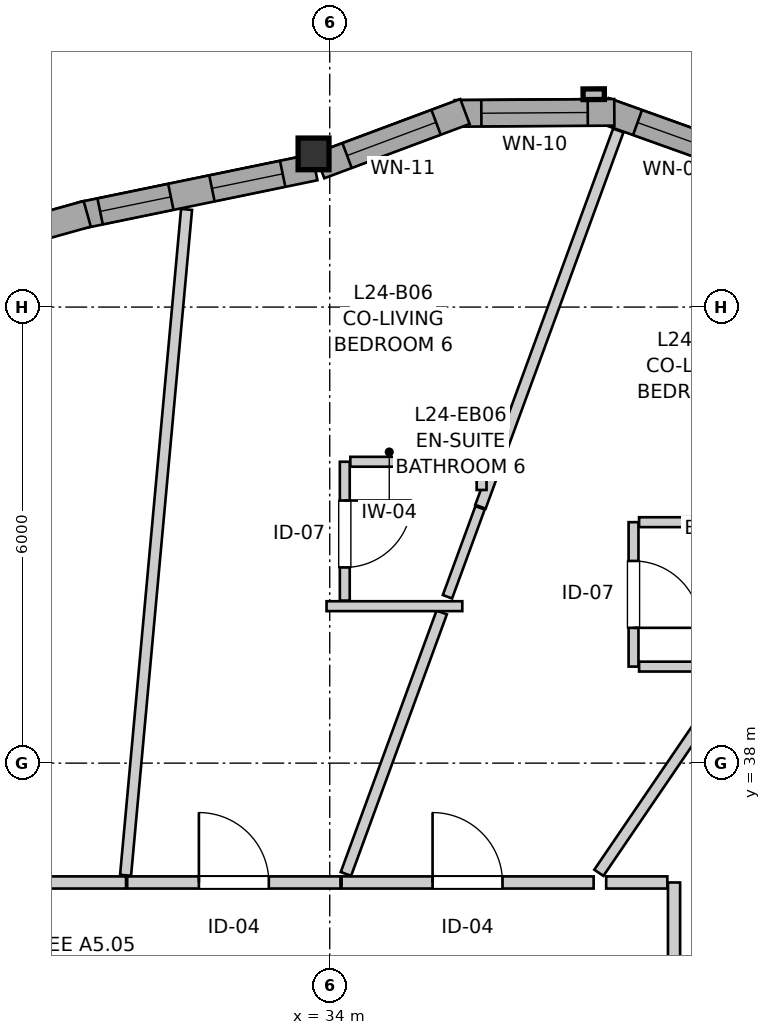
"""IFC4 building model, lengths in metres.
Left out: names, types, materials, properties, quantities, classifications, styles, units other than length and angle.
Written with IfcOpenShell. Run it as: python <this file> out.ifc"""

import sys

from ifc_helpers import new_model, si_unit, direction, frame, frame_2d, origin, origin_2d, place, context, subcontext, project, spatial, rectangle, i_section, extrude, source, transform, mapped, element, fill, save


model = new_model("IFC4")
c1 = context("Model", 3, precision=1e-05, world=origin(), true_north=direction((0.0, 1.0)))
c2 = subcontext(c1, "Body", "Model", "MODEL_VIEW")
j1 = project(units=[si_unit("LENGTHUNIT", "METRE"), si_unit("PLANEANGLEUNIT", "RADIAN")], contexts=[c1])
p1 = place(None, origin())
s1 = spatial("IfcSite", under=j1, at=p1, CompositionType="ELEMENT")
p2 = place(p1, origin())
s2 = spatial("IfcBuilding", under=s1, at=p2, CompositionType="ELEMENT")
p3 = place(p2, frame((0.0, 0.0, 83.2)))
s3 = spatial("IfcBuildingStorey", under=s2, at=p3, CompositionType="ELEMENT", Elevation=83.2)
m1 = source(origin(), c2, "Body", "SweptSolid", [
    extrude(i_section(OverallWidth=0.406, OverallDepth=0.416, WebThickness=0.027, FlangeThickness=0.044, FilletRadius=0.015, at=origin_2d()), origin(), (0.0, 0.0, 1.0), 2.935),
])
p4 = place(p3, frame((33.787, 46.015, 0.0), z_axis=(0.0, 0.0, 1.0), x_axis=(1.0, 0.0, 0.0)))
e1 = element("IfcColumn", 1, at=p4, inside=s3, PredefinedType="PILASTER", context=c2, shape_type="MappedRepresentation", body=[
    mapped(m1, transform((0.0, 0.0, 0.0), x_axis=(1.0, 0.0, 0.0), y_axis=(0.0, 1.0, 0.0), z_axis=(0.0, 0.0, 1.0), scale=1.0)),
])
p5 = place(p3, frame((39.586, 45.877, 0.0), z_axis=(0.0, 0.0, 1.0), x_axis=(-0.941473186867, 0.33708787936, 0.0)))
e2 = element("IfcWall", 2, at=p5, inside=s3, PredefinedType="SOLIDWALL", context=c2, shape_type="SweptSolid", body=[
    extrude(rectangle(XDim=2.099, YDim=0.35, at=frame_2d((1.049, 0.0))), origin(), (0.0, 0.0, 1.0), 2.465),
])
p6 = place(p5, frame((0.283, 0.0, 0.82)))
e3 = element("IfcOpeningElement", 3, at=p6, cuts=e2, PredefinedType="OPENING", context=c2, shape_type="SweptSolid", body=[
    extrude(rectangle(XDim=1.35, YDim=1.45, at=frame_2d((0.675, 0.725))), frame((0.0, 0.185, 0.0), z_axis=(0.0, -1.0, 0.0), x_axis=(1.0, 0.0, 0.0)), (0.0, 0.0, 1.0), 0.37),
])
p7 = place(p3, frame((37.744, 46.562, 0.0), z_axis=(0.0, 0.0, 1.0), x_axis=(-0.999976451414, -0.006862697526, 0.0)))
e4 = element("IfcWall", 4, at=p7, inside=s3, PredefinedType="SOLIDWALL", context=c2, shape_type="SweptSolid", body=[
    extrude(rectangle(XDim=2.099, YDim=0.35, at=frame_2d((1.049, 0.0))), origin(), (0.0, 0.0, 1.0), 2.465),
])
p8 = place(p7, frame((0.35, 0.0, 0.82)))
e5 = element("IfcOpeningElement", 5, at=p8, cuts=e4, PredefinedType="OPENING", context=c2, shape_type="SweptSolid", body=[
    extrude(rectangle(XDim=1.4, YDim=1.35, at=frame_2d((0.7, 0.675))), frame((0.0, 0.185, 0.0), z_axis=(0.0, -1.0, 0.0), x_axis=(1.0, 0.0, 0.0)), (0.0, 0.0, 1.0), 0.37),
])
p9 = place(p3, frame((35.779, 46.573, 0.0), z_axis=(0.0, 0.0, 1.0), x_axis=(-0.9368002254, -0.349864741994, 0.0)))
e6 = element("IfcWall", 6, at=p9, inside=s3, PredefinedType="SOLIDWALL", context=c2, shape_type="SweptSolid", body=[
    extrude(rectangle(XDim=2.041, YDim=0.35, at=frame_2d((1.021, 0.0))), origin(), (0.0, 0.0, 1.0), 2.465),
])
p10 = place(p9, frame((0.406, 0.0, 0.82)))
e7 = element("IfcOpeningElement", 7, at=p10, cuts=e6, PredefinedType="OPENING", context=c2, shape_type="SweptSolid", body=[
    extrude(rectangle(XDim=1.25, YDim=1.35, at=frame_2d((0.625, 0.675))), frame((0.0, 0.185, 0.0), z_axis=(0.0, -1.0, 0.0), x_axis=(1.0, 0.0, 0.0)), (0.0, 0.0, 1.0), 0.37),
])
p11 = place(p3, frame((33.803, 45.84, 0.0), z_axis=(0.0, 0.0, 1.0), x_axis=(-0.97943222174, -0.201773444777, 0.0)))
e8 = element("IfcWall", 8, at=p11, inside=s3, PredefinedType="SOLIDWALL", context=c2, shape_type="SweptSolid", body=[
    extrude(rectangle(XDim=3.144, YDim=0.35, at=frame_2d((1.572, 0.0))), origin(), (0.0, 0.0, 1.0), 2.465),
])
p12 = place(p11, frame((0.431, 0.0, 0.82)))
e9 = element("IfcOpeningElement", 9, at=p12, cuts=e8, PredefinedType="OPENING", context=c2, shape_type="SweptSolid", body=[
    extrude(rectangle(XDim=0.95, YDim=1.35, at=frame_2d((0.475, 0.675))), frame((0.0, 0.185, 0.0), z_axis=(0.0, -1.0, 0.0), x_axis=(1.0, 0.0, 0.0)), (0.0, 0.0, 1.0), 0.37),
])
p13 = place(p11, frame((1.933, 0.0, 0.82)))
e10 = element("IfcOpeningElement", 10, at=p13, cuts=e8, PredefinedType="OPENING", context=c2, shape_type="SweptSolid", body=[
    extrude(rectangle(XDim=0.95, YDim=1.35, at=frame_2d((0.475, 0.675))), frame((0.0, 0.185, 0.0), z_axis=(0.0, -1.0, 0.0), x_axis=(1.0, 0.0, 0.0)), (0.0, 0.0, 1.0), 0.37),
])
p14 = place(p3, frame((30.809, 45.227, 0.0), z_axis=(0.0, 0.0, 1.0), x_axis=(-0.963041637143, -0.269352566591, 0.0)))
e11 = element("IfcWall", 11, at=p14, inside=s3, PredefinedType="SOLIDWALL", context=c2, shape_type="SweptSolid", body=[
    extrude(rectangle(XDim=2.873, YDim=0.35, at=frame_2d((1.437, 0.0))), origin(), (0.0, 0.0, 1.0), 2.465),
])
p15 = place(p14, frame((0.717, 0.0, 0.82)))
e12 = element("IfcOpeningElement", 12, at=p15, cuts=e11, PredefinedType="OPENING", context=c2, shape_type="SweptSolid", body=[
    extrude(rectangle(XDim=1.45, YDim=1.25, at=frame_2d((0.725, 0.625))), frame((0.0, 0.185, 0.0), z_axis=(0.0, -1.0, 0.0), x_axis=(1.0, 0.0, 0.0)), (0.0, 0.0, 1.0), 0.37),
])
p16 = place(p3, frame((38.53, 36.43, 0.0), z_axis=(0.0, 0.0, 1.0), x_axis=(0.0, -1.0, 0.0)))
e13 = element("IfcWall", 13, at=p16, inside=s3, PredefinedType="PARTITIONING", context=c2, shape_type="SweptSolid", body=[
    extrude(rectangle(XDim=4.559, YDim=0.16, at=frame_2d((2.279, 0.0))), origin(), (0.0, 0.0, 1.0), 2.573),
])
p17 = place(p16, frame((1.646, 0.0, 0.0)))
e14 = element("IfcOpeningElement", 14, at=p17, cuts=e13, PredefinedType="OPENING", context=c2, shape_type="SweptSolid", body=[
    extrude(rectangle(XDim=1.3, YDim=2.1, at=frame_2d((0.65, 1.05))), frame((0.0, 0.09, 0.0), z_axis=(0.0, -1.0, 0.0), x_axis=(1.0, 0.0, 0.0)), (0.0, 0.0, 1.0), 0.18),
])
p18 = place(p3, frame((27.307, 36.43, 0.0), z_axis=(0.0, 0.0, 1.0), x_axis=(1.0, 0.0, 0.0)))
e15 = element("IfcWall", 15, at=p18, inside=s3, PredefinedType="PARTITIONING", context=c2, shape_type="SweptSolid", body=[
    extrude(rectangle(XDim=4.013, YDim=0.16, at=frame_2d((2.007, 0.0))), origin(), (0.0, 0.0, 1.0), 2.935),
])
p19 = place(p18, frame((0.22, 0.0, 0.0)))
e16 = element("IfcOpeningElement", 16, at=p19, cuts=e15, PredefinedType="OPENING", context=c2, shape_type="SweptSolid", body=[
    extrude(rectangle(XDim=0.96, YDim=2.1, at=frame_2d((0.48, 1.05))), frame((0.0, 0.09, 0.0), z_axis=(0.0, -1.0, 0.0), x_axis=(1.0, 0.0, 0.0)), (0.0, 0.0, 1.0), 0.18),
])
p20 = place(p3, frame((34.156, 36.43, 0.0), z_axis=(0.0, 0.0, 1.0), x_axis=(1.0, 0.0, 0.0)))
e17 = element("IfcWall", 17, at=p20, inside=s3, PredefinedType="PARTITIONING", context=c2, shape_type="SweptSolid", body=[
    extrude(rectangle(XDim=3.316, YDim=0.16, at=frame_2d((1.658, 0.0))), origin(), (0.0, 0.0, 1.0), 2.935),
])
p21 = place(p20, frame((1.197, 0.0, 0.0)))
e18 = element("IfcOpeningElement", 18, at=p21, cuts=e17, PredefinedType="OPENING", context=c2, shape_type="SweptSolid", body=[
    extrude(rectangle(XDim=0.92, YDim=2.1, at=frame_2d((0.46, 1.05))), frame((0.0, 0.09, 0.0), z_axis=(0.0, -1.0, 0.0), x_axis=(1.0, 0.0, 0.0)), (0.0, 0.0, 1.0), 0.18),
])
p22 = place(p3, frame((31.335, 36.43, 0.0), z_axis=(0.0, 0.0, 1.0), x_axis=(1.0, 0.0, 0.0)))
e19 = element("IfcWall", 19, at=p22, inside=s3, PredefinedType="PARTITIONING", context=c2, shape_type="SweptSolid", body=[
    extrude(rectangle(XDim=2.806, YDim=0.16, at=frame_2d((1.403, 0.0))), origin(), (0.0, 0.0, 1.0), 2.935),
])
p23 = place(p22, frame((0.944, 0.0, 0.0)))
e20 = element("IfcOpeningElement", 20, at=p23, cuts=e19, PredefinedType="OPENING", context=c2, shape_type="SweptSolid", body=[
    extrude(rectangle(XDim=0.92, YDim=2.1, at=frame_2d((0.46, 1.05))), frame((0.0, 0.09, 0.0), z_axis=(0.0, -1.0, 0.0), x_axis=(1.0, 0.0, 0.0)), (0.0, 0.0, 1.0), 0.18),
])
p24 = place(p3, frame((34.198, 41.965, 0.0), z_axis=(0.0, 0.0, 1.0), x_axis=(0.0, -1.0, 0.0)))
e21 = element("IfcWall", 21, at=p24, inside=s3, PredefinedType="PARTITIONING", context=c2, shape_type="SweptSolid", body=[
    extrude(rectangle(XDim=1.827, YDim=0.13, at=frame_2d((0.914, 0.0))), origin(), (0.0, 0.0, 1.0), 2.935),
])
p25 = place(p24, frame((0.51, 0.0, 0.0)))
e22 = element("IfcOpeningElement", 22, at=p25, cuts=e21, PredefinedType="OPENING", context=c2, shape_type="SweptSolid", body=[
    extrude(rectangle(XDim=0.88, YDim=2.05, at=frame_2d((0.44, 1.025))), frame((0.0, 0.075, 0.0), z_axis=(0.0, -1.0, 0.0), x_axis=(1.0, 0.0, 0.0)), (0.0, 0.0, 1.0), 0.15),
])
p26 = place(p3, frame((37.997, 41.17, 0.0), z_axis=(0.0, 0.0, 1.0), x_axis=(0.0, -1.0, 0.0)))
e23 = element("IfcWall", 23, at=p26, inside=s3, PredefinedType="PARTITIONING", context=c2, shape_type="SweptSolid", body=[
    extrude(rectangle(XDim=1.9, YDim=0.13, at=frame_2d((0.95, 0.0))), origin(), (0.0, 0.0, 1.0), 2.935),
])
p27 = place(p26, frame((0.51, 0.0, 0.0)))
e24 = element("IfcOpeningElement", 24, at=p27, cuts=e23, PredefinedType="OPENING", context=c2, shape_type="SweptSolid", body=[
    extrude(rectangle(XDim=0.88, YDim=2.05, at=frame_2d((0.44, 1.025))), frame((0.0, 0.075, 0.0), z_axis=(0.0, -1.0, 0.0), x_axis=(1.0, 0.0, 0.0)), (0.0, 0.0, 1.0), 0.15),
])
p28 = place(p3, frame((31.314, 36.525, 0.0), z_axis=(0.0, 0.0, 1.0), x_axis=(0.091226381691, 0.995830179942, 0.0)))
e25 = element("IfcWall", 25, at=p28, inside=s3, PredefinedType="PARTITIONING", context=c2, shape_type="SweptSolid", body=[
    extrude(rectangle(XDim=8.797, YDim=0.145, at=frame_2d((4.398, 0.0))), origin(), (0.0, 0.0, 1.0), 2.935),
])
p29 = place(p3, frame((38.659, 31.93, 0.0), z_axis=(0.0, 0.0, 1.0), x_axis=(0.813936175568, 0.580954302938, 0.0)))
e26 = element("IfcWall", 26, at=p29, inside=s3, PredefinedType="PARTITIONING", context=c2, shape_type="SweptSolid", body=[
    extrude(rectangle(XDim=6.346, YDim=0.145, at=frame_2d((3.173, 0.0))), origin(), (0.0, 0.0, 1.0), 2.935),
])
p30 = place(p3, frame((35.983, 41.373, 0.0), z_axis=(0.0, 0.0, 1.0), x_axis=(0.343972978133, 0.938979547335, 0.0)))
e27 = element("IfcWall", 27, at=p30, inside=s3, PredefinedType="PARTITIONING", context=c2, shape_type="SweptSolid", body=[
    extrude(rectangle(XDim=5.272, YDim=0.145, at=frame_2d((2.636, 0.0))), origin(), (0.0, 0.0, 1.0), 2.935),
])
p31 = place(p3, frame((34.213, 36.542, 0.0), z_axis=(0.0, 0.0, 1.0), x_axis=(0.343978558693, 0.93897750301, 0.0)))
e28 = element("IfcWall", 28, at=p31, inside=s3, PredefinedType="PARTITIONING", context=c2, shape_type="SweptSolid", body=[
    extrude(rectangle(XDim=3.664, YDim=0.145, at=frame_2d((1.832, 0.0))), origin(), (0.0, 0.0, 1.0), 2.935),
])
p32 = place(p3, frame((37.541, 36.557, 0.0), z_axis=(0.0, 0.0, 1.0), x_axis=(0.563020017907, 0.826443258449, 0.0)))
e29 = element("IfcWall", 29, at=p32, inside=s3, PredefinedType="PARTITIONING", context=c2, shape_type="SweptSolid", body=[
    extrude(rectangle(XDim=3.3, YDim=0.145, at=frame_2d((1.65, 0.0))), origin(), (0.0, 0.0, 1.0), 2.935),
])
p33 = place(p3, frame((38.07, 41.17, 0.0), z_axis=(0.0, 0.0, 1.0), x_axis=(1.0, 0.0, 0.0)))
e30 = element("IfcWall", 30, at=p33, inside=s3, PredefinedType="PARTITIONING", context=c2, shape_type="SweptSolid", body=[
    extrude(rectangle(XDim=1.727, YDim=0.13, at=frame_2d((0.864, 0.0))), origin(), (0.0, 0.0, 1.0), 2.935),
])
p34 = place(p3, frame((34.271, 41.965, 0.0), z_axis=(0.0, 0.0, 1.0), x_axis=(1.0, 0.0, 0.0)))
e31 = element("IfcWall", 31, at=p34, inside=s3, PredefinedType="PARTITIONING", context=c2, shape_type="SweptSolid", body=[
    extrude(rectangle(XDim=1.727, YDim=0.13, at=frame_2d((0.864, 0.0))), origin(), (0.0, 0.0, 1.0), 2.103),
])
p35 = place(p3, frame((38.07, 39.27, 0.0), z_axis=(0.0, 0.0, 1.0), x_axis=(1.0, 0.0, 0.0)))
e32 = element("IfcWall", 32, at=p35, inside=s3, PredefinedType="PARTITIONING", context=c2, shape_type="SweptSolid", body=[
    extrude(rectangle(XDim=1.179, YDim=0.13, at=frame_2d((0.589, 0.0))), origin(), (0.0, 0.0, 1.0), 2.935),
])
p36 = place(p3, frame((35.549, 40.189, 0.0), z_axis=(0.0, 0.0, 1.0), x_axis=(0.344070409158, 0.938943850048, 0.0)))
e33 = element("IfcWall", 33, at=p36, inside=s3, PredefinedType="PARTITIONING", context=c2, shape_type="SweptSolid", body=[
    extrude(rectangle(XDim=1.246, YDim=0.13, at=frame_2d((0.623, 0.0))), origin(), (0.0, 0.0, 1.0), 2.935),
])
p37 = place(p3, frame((33.958, 40.065, 0.0), z_axis=(0.0, 0.0, 1.0), x_axis=(1.0, 0.0, 0.0)))
e34 = element("IfcWall", 34, at=p37, inside=s3, PredefinedType="PARTITIONING", context=c2, shape_type="SweptSolid", body=[
    extrude(rectangle(XDim=1.786, YDim=0.13, at=frame_2d((0.893, 0.0))), origin(), (0.0, 0.0, 1.0), 2.935),
])
p38 = place(p3, frame((37.637, 36.43, 0.0), z_axis=(0.0, 0.0, 1.0), x_axis=(1.0, 0.0, 0.0)))
e35 = element("IfcWall", 35, at=p38, inside=s3, PredefinedType="PARTITIONING", context=c2, shape_type="SweptSolid", body=[
    extrude(rectangle(XDim=0.805, YDim=0.16, at=frame_2d((0.402, 0.0))), origin(), (0.0, 0.0, 1.0), 2.935),
])
p39 = place(p3, frame((35.998, 41.594, 0.0), z_axis=(0.0, 0.0, 1.0), x_axis=(0.0, 1.0, 0.0)))
e36 = element("IfcWall", 36, at=p39, inside=s3, PredefinedType="PARTITIONING", context=c2, shape_type="SweptSolid", body=[
    extrude(rectangle(XDim=0.371, YDim=0.13, at=frame_2d((0.186, 0.0))), origin(), (0.0, 0.0, 1.0), 2.935),
])
m2 = source(origin(), c2, "Body", "SweptSolid", [
    extrude(rectangle(XDim=1.35, YDim=1.45, at=frame_2d((0.675, 0.725))), frame((0.0, 0.03, 0.0), z_axis=(0.0, -1.0, 0.0), x_axis=(1.0, 0.0, 0.0)), (0.0, 0.0, 1.0), 0.06),
])
p40 = place(p6, origin())
e37 = element("IfcWindow", 37, at=p40, inside=s3, PartitioningType="SINGLE_PANEL", PredefinedType="WINDOW", context=c2, shape_type="MappedRepresentation", body=[
    mapped(m2, transform((0.0, 0.0, 0.0), x_axis=(1.0, 0.0, 0.0), y_axis=(0.0, 1.0, 0.0), z_axis=(0.0, 0.0, 1.0), scale=1.0)),
])
fill(e3, e37)
m3 = source(origin(), c2, "Body", "SweptSolid", [
    extrude(rectangle(XDim=1.4, YDim=1.35, at=frame_2d((0.7, 0.675))), frame((0.0, 0.03, 0.0), z_axis=(0.0, -1.0, 0.0), x_axis=(1.0, 0.0, 0.0)), (0.0, 0.0, 1.0), 0.06),
])
p41 = place(p8, origin())
e38 = element("IfcWindow", 38, at=p41, inside=s3, PartitioningType="SINGLE_PANEL", PredefinedType="WINDOW", context=c2, shape_type="MappedRepresentation", body=[
    mapped(m3, transform((0.0, 0.0, 0.0), x_axis=(1.0, 0.0, 0.0), y_axis=(0.0, 1.0, 0.0), z_axis=(0.0, 0.0, 1.0), scale=1.0)),
])
fill(e5, e38)
m4 = source(origin(), c2, "Body", "SweptSolid", [
    extrude(rectangle(XDim=1.25, YDim=1.35, at=frame_2d((0.625, 0.675))), frame((0.0, 0.03, 0.0), z_axis=(0.0, -1.0, 0.0), x_axis=(1.0, 0.0, 0.0)), (0.0, 0.0, 1.0), 0.06),
])
p42 = place(p10, origin())
e39 = element("IfcWindow", 39, at=p42, inside=s3, PartitioningType="SINGLE_PANEL", PredefinedType="WINDOW", context=c2, shape_type="MappedRepresentation", body=[
    mapped(m4, transform((0.0, 0.0, 0.0), x_axis=(1.0, 0.0, 0.0), y_axis=(0.0, 1.0, 0.0), z_axis=(0.0, 0.0, 1.0), scale=1.0)),
])
fill(e7, e39)
m5 = source(origin(), c2, "Body", "SweptSolid", [
    extrude(rectangle(XDim=0.95, YDim=1.35, at=frame_2d((0.475, 0.675))), frame((0.0, 0.03, 0.0), z_axis=(0.0, -1.0, 0.0), x_axis=(1.0, 0.0, 0.0)), (0.0, 0.0, 1.0), 0.06),
])
p43 = place(p12, origin())
e40 = element("IfcWindow", 40, at=p43, inside=s3, PartitioningType="SINGLE_PANEL", PredefinedType="WINDOW", context=c2, shape_type="MappedRepresentation", body=[
    mapped(m5, transform((0.0, 0.0, 0.0), x_axis=(1.0, 0.0, 0.0), y_axis=(0.0, 1.0, 0.0), z_axis=(0.0, 0.0, 1.0), scale=1.0)),
])
fill(e9, e40)
p44 = place(p13, origin())
e41 = element("IfcWindow", 41, at=p44, inside=s3, PartitioningType="SINGLE_PANEL", PredefinedType="WINDOW", context=c2, shape_type="MappedRepresentation", body=[
    mapped(m5, transform((0.0, 0.0, 0.0), x_axis=(1.0, 0.0, 0.0), y_axis=(0.0, 1.0, 0.0), z_axis=(0.0, 0.0, 1.0), scale=1.0)),
])
fill(e10, e41)
m6 = source(origin(), c2, "Body", "SweptSolid", [
    extrude(rectangle(XDim=0.92, YDim=2.1, at=frame_2d((0.46, 1.05))), frame((0.0, 0.025, 0.0), z_axis=(0.0, -1.0, 0.0), x_axis=(1.0, 0.0, 0.0)), (0.0, 0.0, 1.0), 0.05),
])
p45 = place(p21, origin())
e42 = element("IfcDoor", 42, at=p45, inside=s3, OperationType="SINGLE_SWING_LEFT", PredefinedType="DOOR", context=c2, shape_type="MappedRepresentation", body=[
    mapped(m6, transform((0.0, 0.0, 0.0), x_axis=(1.0, 0.0, 0.0), y_axis=(0.0, 1.0, 0.0), z_axis=(0.0, 0.0, 1.0), scale=1.0)),
])
fill(e18, e42)
p46 = place(p23, origin())
e43 = element("IfcDoor", 43, at=p46, inside=s3, OperationType="SINGLE_SWING_LEFT", PredefinedType="DOOR", context=c2, shape_type="MappedRepresentation", body=[
    mapped(m6, transform((0.0, 0.0, 0.0), x_axis=(1.0, 0.0, 0.0), y_axis=(0.0, 1.0, 0.0), z_axis=(0.0, 0.0, 1.0), scale=1.0)),
])
fill(e20, e43)
m7 = source(origin(), c2, "Body", "SweptSolid", [
    extrude(rectangle(XDim=0.88, YDim=2.05, at=frame_2d((0.44, 1.025))), frame((0.0, 0.025, 0.0), z_axis=(0.0, -1.0, 0.0), x_axis=(1.0, 0.0, 0.0)), (0.0, 0.0, 1.0), 0.05),
])
p47 = place(p25, origin())
e44 = element("IfcDoor", 44, at=p47, inside=s3, OperationType="SINGLE_SWING_LEFT", PredefinedType="DOOR", context=c2, shape_type="MappedRepresentation", body=[
    mapped(m7, transform((0.0, 0.0, 0.0), x_axis=(1.0, 0.0, 0.0), y_axis=(0.0, 1.0, 0.0), z_axis=(0.0, 0.0, 1.0), scale=1.0)),
])
fill(e22, e44)
p48 = place(p27, origin())
e45 = element("IfcDoor", 45, at=p48, inside=s3, OperationType="SINGLE_SWING_RIGHT", PredefinedType="DOOR", context=c2, shape_type="MappedRepresentation", body=[
    mapped(m7, transform((0.0, 0.0, 0.0), x_axis=(1.0, 0.0, 0.0), y_axis=(0.0, 1.0, 0.0), z_axis=(0.0, 0.0, 1.0), scale=1.0)),
])
fill(e24, e45)
save(model, sys.argv[1])
